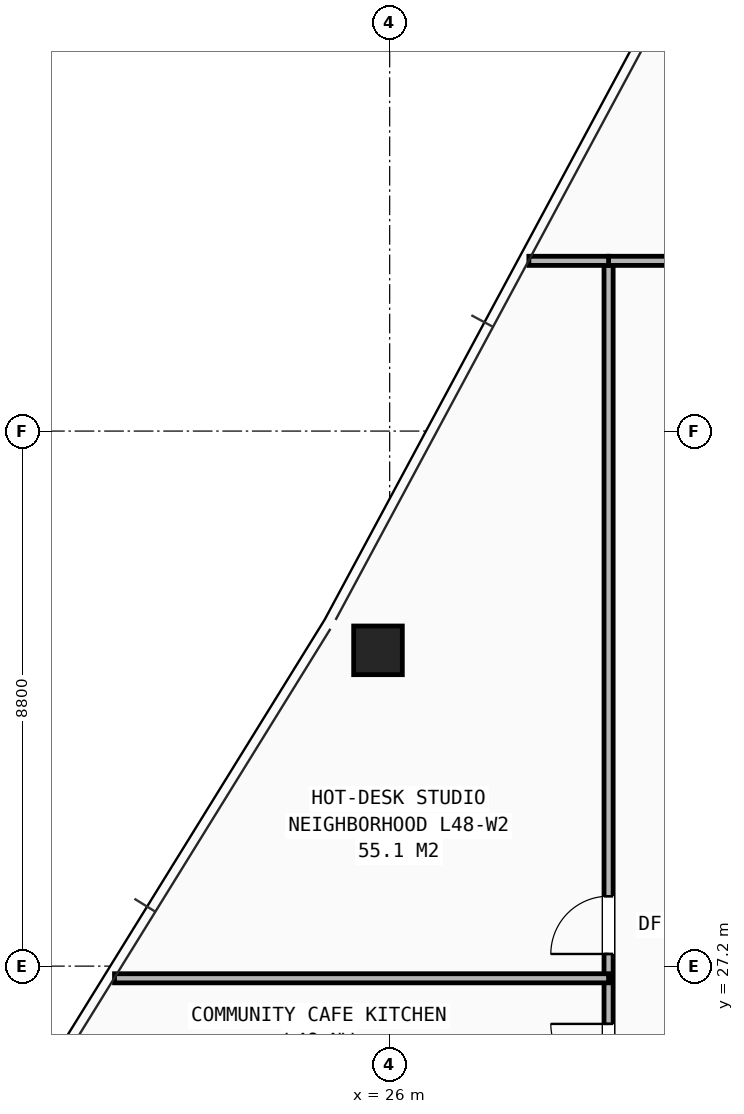
"""IFC4 building model, lengths in metres.
Left out: names, types, materials, properties, quantities, classifications, styles, units other than length and angle.
Written with IfcOpenShell. Run it as: python <this file> out.ifc"""

import sys

from ifc_helpers import new_model, si_unit, direction, frame, frame_2d, origin, origin_2d, place, context, subcontext, project, spatial, rectangle, hollow_rectangle, extrude, element, fill, save


model = new_model("IFC4")
c1 = context("Model", 3, precision=1e-05, world=origin(), true_north=direction((0.0, 1.0)))
c2 = subcontext(c1, "Body", "Model", "MODEL_VIEW")
j1 = project(units=[si_unit("LENGTHUNIT", "METRE"), si_unit("PLANEANGLEUNIT", "RADIAN")], contexts=[c1])
p1 = place(None, origin())
s1 = spatial("IfcSite", under=j1, at=p1, CompositionType="ELEMENT")
p2 = place(p1, origin())
s2 = spatial("IfcBuilding", under=s1, at=p2, CompositionType="ELEMENT")
p3 = place(p2, frame((0.0, 0.0, 168.9)))
s3 = spatial("IfcBuildingStorey", under=s2, at=p3, CompositionType="ELEMENT", Elevation=168.9)
p4 = place(p3, frame((25.808, 32.394, 0.0), z_axis=(0.0, 0.0, 1.0), x_axis=(1.0, 0.0, 0.0)))
e1 = element("IfcColumn", 1, at=p4, inside=s3, PredefinedType="COLUMN", context=c2, shape_type="SweptSolid", body=[
    extrude(hollow_rectangle(XDim=0.8, YDim=0.8, WallThickness=0.055, at=origin_2d()), origin(), (0.0, 0.0, 1.0), 3.45),
])
p5 = place(p3, frame((29.6, 24.9, 0.0), z_axis=(0.0, 0.0, 1.0), x_axis=(0.0, 1.0, 0.0)))
e2 = element("IfcWall", 2, at=p5, inside=s3, PredefinedType="PARTITIONING", context=c2, shape_type="SweptSolid", body=[
    extrude(rectangle(XDim=13.9, YDim=0.15, at=frame_2d((6.95, 0.0))), origin(), (0.0, 0.0, 1.0), 2.225),
])
p6 = place(p5, frame((0.4, 0.0, 0.0)))
e3 = element("IfcOpeningElement", 3, at=p6, cuts=e2, PredefinedType="OPENING", context=c2, shape_type="SweptSolid", body=[
    extrude(rectangle(XDim=0.95, YDim=2.1, at=frame_2d((0.475, 1.05))), frame((0.0, 0.085, 0.0), z_axis=(0.0, -1.0, 0.0), x_axis=(1.0, 0.0, 0.0)), (0.0, 0.0, 1.0), 0.17),
])
p7 = place(p5, frame((2.5, 0.0, 0.0)))
e4 = element("IfcOpeningElement", 4, at=p7, cuts=e2, PredefinedType="OPENING", context=c2, shape_type="SweptSolid", body=[
    extrude(rectangle(XDim=0.95, YDim=2.1, at=frame_2d((0.475, 1.05))), frame((0.0, 0.085, 0.0), z_axis=(0.0, -1.0, 0.0), x_axis=(1.0, 0.0, 0.0)), (0.0, 0.0, 1.0), 0.17),
])
p8 = place(p3, frame((29.6, 38.8, 0.0), z_axis=(0.0, 0.0, 1.0), x_axis=(1.0, 0.0, 0.0)))
e5 = element("IfcWall", 5, at=p8, inside=s3, PredefinedType="PARTITIONING", context=c2, shape_type="SweptSolid", body=[
    extrude(rectangle(XDim=2.2, YDim=0.15, at=frame_2d((1.1, 0.0))), origin(), (0.0, 0.0, 1.0), 2.589),
])
p9 = place(p3, frame((28.289, 38.8, 0.0), z_axis=(0.0, 0.0, 1.0), x_axis=(1.0, 0.0, 0.0)))
e6 = element("IfcWall", 6, at=p9, inside=s3, PredefinedType="PARTITIONING", context=c2, shape_type="SweptSolid", body=[
    extrude(rectangle(XDim=1.311, YDim=0.15, at=frame_2d((0.655, 0.0))), origin(), (0.0, 0.0, 1.0), 2.589),
])
p10 = place(p3, frame((21.475, 27.0, 0.0), z_axis=(0.0, 0.0, 1.0), x_axis=(1.0, 0.0, 0.0)))
e7 = element("IfcWall", 7, at=p10, inside=s3, PredefinedType="PARTITIONING", context=c2, shape_type="SweptSolid", body=[
    extrude(rectangle(XDim=8.125, YDim=0.15, at=frame_2d((4.063, 0.0))), origin(), (0.0, 0.0, 1.0), 2.589),
])
p11 = place(p6, origin())
e8 = element("IfcDoor", 8, at=p11, inside=s3, OperationType="SINGLE_SWING_RIGHT", PredefinedType="DOOR", context=c2, shape_type="SweptSolid", body=[
    extrude(rectangle(XDim=0.95, YDim=2.1, at=frame_2d((0.475, 1.05))), frame((0.0, 0.025, 0.0), z_axis=(0.0, -1.0, 0.0), x_axis=(1.0, 0.0, 0.0)), (0.0, 0.0, 1.0), 0.05),
])
fill(e3, e8)
p12 = place(p7, origin())
e9 = element("IfcDoor", 9, at=p12, inside=s3, OperationType="SINGLE_SWING_LEFT", PredefinedType="DOOR", context=c2, shape_type="SweptSolid", body=[
    extrude(rectangle(XDim=0.95, YDim=2.1, at=frame_2d((0.475, 1.05))), frame((0.0, 0.025, 0.0), z_axis=(0.0, -1.0, 0.0), x_axis=(1.0, 0.0, 0.0)), (0.0, 0.0, 1.0), 0.05),
])
fill(e4, e9)
save(model, sys.argv[1])
